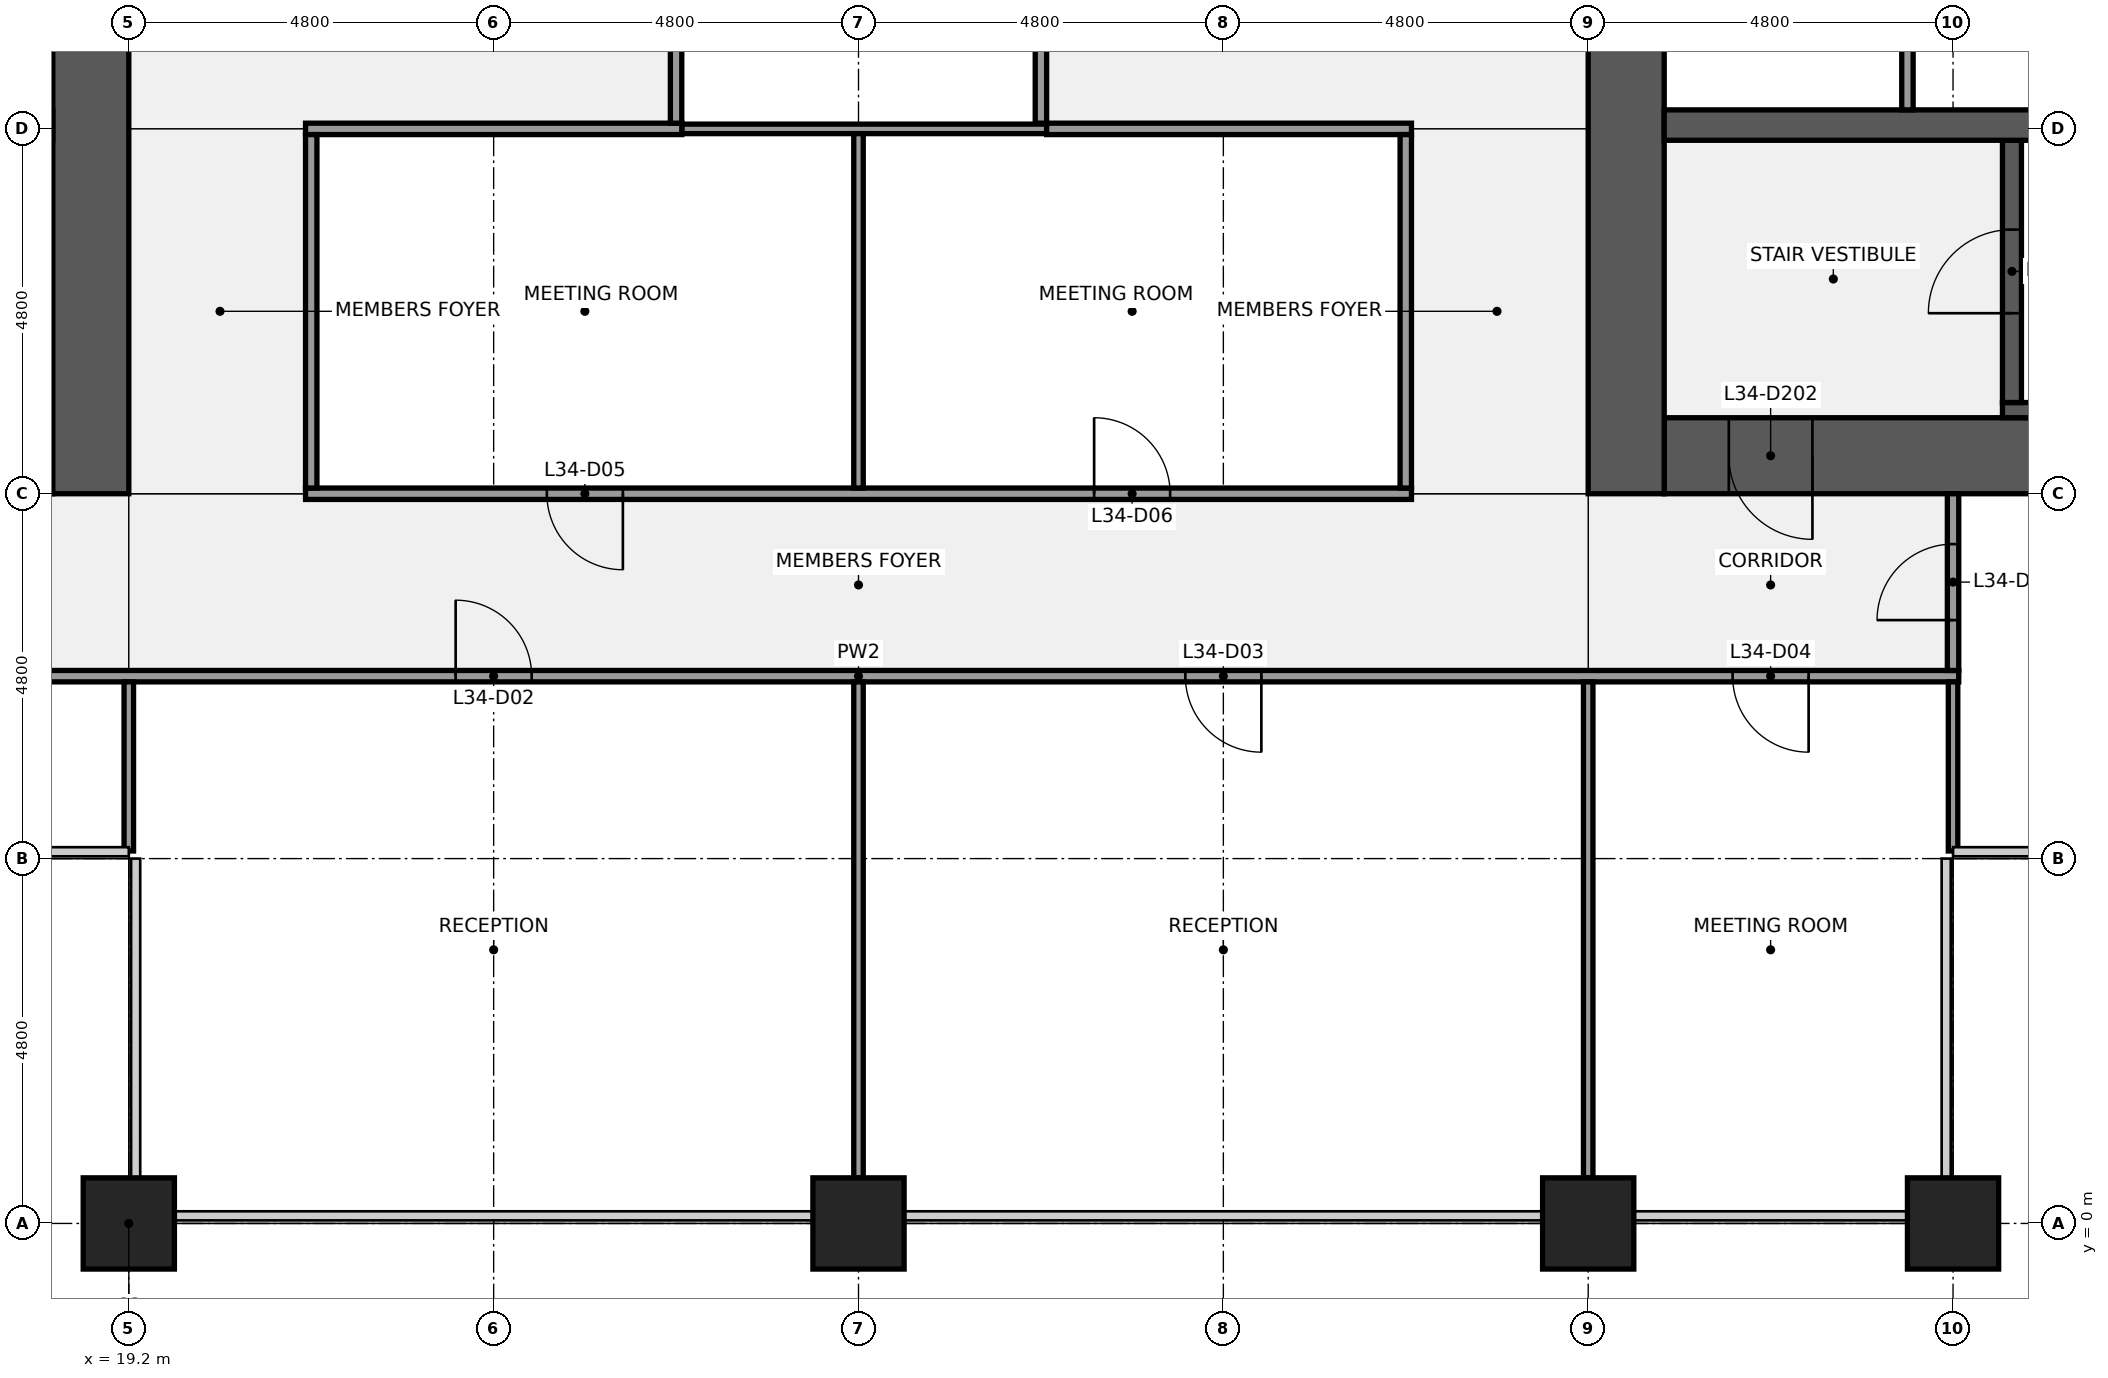
"""IFC4 building model, lengths in metres.
Left out: names, types, materials, properties, quantities, classifications, styles, units other than length and angle.
Written with IfcOpenShell. Run it as: python <this file> out.ifc"""

import sys

from ifc_helpers import new_model, si_unit, direction, frame, frame_2d, origin, origin_2d, place, context, subcontext, project, spatial, rectangle, extrude, element, fill, save


model = new_model("IFC4")
c1 = context("Model", 3, precision=1e-05, world=origin(), true_north=direction((0.0, 1.0)))
c2 = subcontext(c1, "Body", "Model", "MODEL_VIEW")
j1 = project(units=[si_unit("LENGTHUNIT", "METRE"), si_unit("PLANEANGLEUNIT", "RADIAN")], contexts=[c1])
p1 = place(None, origin())
s1 = spatial("IfcSite", under=j1, at=p1, CompositionType="ELEMENT")
p2 = place(p1, origin())
s2 = spatial("IfcBuilding", under=s1, at=p2, CompositionType="ELEMENT")
p3 = place(p2, frame((0.0, 0.0, 156.1)))
s3 = spatial("IfcBuildingStorey", under=s2, at=p3, CompositionType="ELEMENT", Elevation=156.1)
for number, where, z_axis, x_axis in (
    (1, (19.2, 0.0, 0.0), (0.0, 0.0, 1.0), (1.0, 0.0, 0.0)),
    (2, (28.8, 0.0, 0.0), (0.0, 0.0, 1.0), (1.0, 0.0, 0.0)),
    (3, (38.4, 0.0, 0.0), (0.0, 0.0, 1.0), (1.0, 0.0, 0.0)),
    (4, (43.2, 0.0, 0.0), (0.0, 0.0, 1.0), (1.0, 0.0, 0.0)),
):
    element("IfcColumn", number, at=place(p3, frame(where, z_axis=z_axis, x_axis=x_axis)), inside=s3, PredefinedType="COLUMN", context=c2, shape_type="SweptSolid", body=[
        extrude(rectangle(XDim=1.2, YDim=1.2, at=origin_2d()), origin(), (0.0, 0.0, 1.0), 4.0),
    ])
p4 = place(p3, frame((18.2, 10.1, 0.0), z_axis=(0.0, 0.0, 1.0), x_axis=(-1.0, 0.0, 0.0)))
e5 = element("IfcWall", 5, at=p4, inside=s3, PredefinedType="SHEAR", context=c2, shape_type="SweptSolid", body=[
    extrude(rectangle(XDim=8.6, YDim=1.0, at=frame_2d((4.3, 0.0))), origin(), (0.0, 0.0, 1.0), 3.84),
])
p5 = place(p4, frame((0.85, 0.0, 0.0)))
e6 = element("IfcOpeningElement", 6, at=p5, cuts=e5, PredefinedType="OPENING", context=c2, shape_type="SweptSolid", body=[
    extrude(rectangle(XDim=1.1, YDim=2.1, at=frame_2d((0.55, 1.05))), frame((0.0, 0.51, 0.0), z_axis=(0.0, -1.0, 0.0), x_axis=(1.0, 0.0, 0.0)), (0.0, 0.0, 1.0), 1.02),
])
p6 = place(p3, frame((18.7, 38.4, 0.0), z_axis=(0.0, 0.0, 1.0), x_axis=(0.0, -1.0, 0.0)))
e7 = element("IfcWall", 7, at=p6, inside=s3, PredefinedType="SHEAR", context=c2, shape_type="SweptSolid", body=[
    extrude(rectangle(XDim=28.8, YDim=1.0, at=frame_2d((14.4, 0.0))), origin(), (0.0, 0.0, 1.0), 3.84),
])
p7 = place(p6, frame((18.3, 0.0, 0.0)))
e8 = element("IfcOpeningElement", 8, at=p7, cuts=e7, PredefinedType="OPENING", context=c2, shape_type="SweptSolid", body=[
    extrude(rectangle(XDim=1.8, YDim=2.1, at=frame_2d((0.9, 1.05))), frame((0.0, 0.51, 0.0), z_axis=(0.0, -1.0, 0.0), x_axis=(1.0, 0.0, 0.0)), (0.0, 0.0, 1.0), 1.02),
])
p8 = place(p6, frame((8.7, 0.0, 0.0)))
e9 = element("IfcOpeningElement", 9, at=p8, cuts=e7, PredefinedType="OPENING", context=c2, shape_type="SweptSolid", body=[
    extrude(rectangle(XDim=1.8, YDim=2.1, at=frame_2d((0.9, 1.05))), frame((0.0, 0.51, 0.0), z_axis=(0.0, -1.0, 0.0), x_axis=(1.0, 0.0, 0.0)), (0.0, 0.0, 1.0), 1.02),
])
p9 = place(p3, frame((1.0, 14.45, 0.0), z_axis=(0.0, 0.0, 1.0), x_axis=(1.0, 0.0, 0.0)))
e10 = element("IfcWall", 10, at=p9, inside=s3, PredefinedType="SHEAR", context=c2, shape_type="SweptSolid", body=[
    extrude(rectangle(XDim=17.2, YDim=0.4, at=frame_2d((8.6, 0.0))), origin(), (0.0, 0.0, 1.0), 3.84),
])
p10 = place(p3, frame((48.0, 10.1, 0.0), z_axis=(0.0, 0.0, 1.0), x_axis=(-1.0, 0.0, 0.0)))
e11 = element("IfcWall", 11, at=p10, inside=s3, PredefinedType="SHEAR", context=c2, shape_type="SweptSolid", body=[
    extrude(rectangle(XDim=8.6, YDim=1.0, at=frame_2d((4.3, 0.0))), origin(), (0.0, 0.0, 1.0), 3.84),
])
p11 = place(p10, frame((6.65, 0.0, 0.0)))
e12 = element("IfcOpeningElement", 12, at=p11, cuts=e11, PredefinedType="OPENING", context=c2, shape_type="SweptSolid", body=[
    extrude(rectangle(XDim=1.1, YDim=2.1, at=frame_2d((0.55, 1.05))), frame((0.0, 0.51, 0.0), z_axis=(0.0, -1.0, 0.0), x_axis=(1.0, 0.0, 0.0)), (0.0, 0.0, 1.0), 1.02),
])
p12 = place(p3, frame((38.9, 9.6, 0.0), z_axis=(0.0, 0.0, 1.0), x_axis=(0.0, 1.0, 0.0)))
e13 = element("IfcWall", 13, at=p12, inside=s3, PredefinedType="SHEAR", context=c2, shape_type="SweptSolid", body=[
    extrude(rectangle(XDim=28.8, YDim=1.0, at=frame_2d((14.4, 0.0))), origin(), (0.0, 0.0, 1.0), 3.84),
])
p13 = place(p12, frame((8.7, 0.0, 0.0)))
e14 = element("IfcOpeningElement", 14, at=p13, cuts=e13, PredefinedType="OPENING", context=c2, shape_type="SweptSolid", body=[
    extrude(rectangle(XDim=1.8, YDim=2.1, at=frame_2d((0.9, 1.05))), frame((0.0, 0.51, 0.0), z_axis=(0.0, -1.0, 0.0), x_axis=(1.0, 0.0, 0.0)), (0.0, 0.0, 1.0), 1.02),
])
p14 = place(p12, frame((18.3, 0.0, 0.0)))
e15 = element("IfcOpeningElement", 15, at=p14, cuts=e13, PredefinedType="OPENING", context=c2, shape_type="SweptSolid", body=[
    extrude(rectangle(XDim=1.8, YDim=2.1, at=frame_2d((0.9, 1.05))), frame((0.0, 0.51, 0.0), z_axis=(0.0, -1.0, 0.0), x_axis=(1.0, 0.0, 0.0)), (0.0, 0.0, 1.0), 1.02),
])
p15 = place(p3, frame((43.85, 10.7, 0.0), z_axis=(0.0, 0.0, 1.0), x_axis=(1.0, 0.0, 0.0)))
e16 = element("IfcWall", 16, at=p15, inside=s3, PredefinedType="SHEAR", context=c2, shape_type="SweptSolid", body=[
    extrude(rectangle(XDim=4.15, YDim=0.2, at=frame_2d((2.075, 0.0))), origin(), (0.0, 0.0, 1.0), 3.84),
])
p16 = place(p3, frame((43.975, 10.8, 0.0), z_axis=(0.0, 0.0, 1.0), x_axis=(0.0, 1.0, 0.0)))
e17 = element("IfcWall", 17, at=p16, inside=s3, PredefinedType="SHEAR", context=c2, shape_type="SweptSolid", body=[
    extrude(rectangle(XDim=3.45, YDim=0.25, at=frame_2d((1.725, 0.0))), origin(), (0.0, 0.0, 1.0), 3.84),
])
p17 = place(p16, frame((1.175, 0.0, 0.0)))
e18 = element("IfcOpeningElement", 18, at=p17, cuts=e17, PredefinedType="OPENING", context=c2, shape_type="SweptSolid", body=[
    extrude(rectangle(XDim=1.1, YDim=2.1, at=frame_2d((0.55, 1.05))), frame((0.0, 0.135, 0.0), z_axis=(0.0, -1.0, 0.0), x_axis=(1.0, 0.0, 0.0)), (0.0, 0.0, 1.0), 0.27),
])
p18 = place(p3, frame((39.4, 14.45, 0.0), z_axis=(0.0, 0.0, 1.0), x_axis=(1.0, 0.0, 0.0)))
e19 = element("IfcWall", 19, at=p18, inside=s3, PredefinedType="SHEAR", context=c2, shape_type="SweptSolid", body=[
    extrude(rectangle(XDim=17.2, YDim=0.4, at=frame_2d((8.6, 0.0))), origin(), (0.0, 0.0, 1.0), 3.84),
])
p19 = place(p3, frame((42.6, 14.65, 0.0), z_axis=(0.0, 0.0, 1.0), x_axis=(0.0, 1.0, 0.0)))
e20 = element("IfcWall", 20, at=p19, inside=s3, PredefinedType="PARTITIONING", context=c2, shape_type="SweptSolid", body=[
    extrude(rectangle(XDim=2.6, YDim=0.15, at=frame_2d((1.3, 0.0))), origin(), (0.0, 0.0, 1.0), 3.84),
])
p20 = place(p3, frame((14.325, 7.2, 0.0), z_axis=(0.0, 0.0, 1.0), x_axis=(1.0, 0.0, 0.0)))
e21 = element("IfcWall", 21, at=p20, inside=s3, PredefinedType="PARTITIONING", context=c2, shape_type="SweptSolid", body=[
    extrude(rectangle(XDim=28.95, YDim=0.15, at=frame_2d((14.475, 0.0))), origin(), (0.0, 0.0, 1.0), 2.936),
])
p21 = place(p20, frame((1.975, 0.0, 0.0)))
e22 = element("IfcOpeningElement", 22, at=p21, cuts=e21, PredefinedType="OPENING", context=c2, shape_type="SweptSolid", body=[
    extrude(rectangle(XDim=1.0, YDim=2.1, at=frame_2d((0.5, 1.05))), frame((0.0, 0.085, 0.0), z_axis=(0.0, -1.0, 0.0), x_axis=(1.0, 0.0, 0.0)), (0.0, 0.0, 1.0), 0.17),
])
p22 = place(p20, frame((9.175, 0.0, 0.0)))
e23 = element("IfcOpeningElement", 23, at=p22, cuts=e21, PredefinedType="OPENING", context=c2, shape_type="SweptSolid", body=[
    extrude(rectangle(XDim=1.0, YDim=2.1, at=frame_2d((0.5, 1.05))), frame((0.0, 0.085, 0.0), z_axis=(0.0, -1.0, 0.0), x_axis=(1.0, 0.0, 0.0)), (0.0, 0.0, 1.0), 0.17),
])
p23 = place(p20, frame((18.775, 0.0, 0.0)))
e24 = element("IfcOpeningElement", 24, at=p23, cuts=e21, PredefinedType="OPENING", context=c2, shape_type="SweptSolid", body=[
    extrude(rectangle(XDim=1.0, YDim=2.1, at=frame_2d((0.5, 1.05))), frame((0.0, 0.085, 0.0), z_axis=(0.0, -1.0, 0.0), x_axis=(1.0, 0.0, 0.0)), (0.0, 0.0, 1.0), 0.17),
])
p24 = place(p20, frame((25.975, 0.0, 0.0)))
e25 = element("IfcOpeningElement", 25, at=p24, cuts=e21, PredefinedType="OPENING", context=c2, shape_type="SweptSolid", body=[
    extrude(rectangle(XDim=1.0, YDim=2.1, at=frame_2d((0.5, 1.05))), frame((0.0, 0.085, 0.0), z_axis=(0.0, -1.0, 0.0), x_axis=(1.0, 0.0, 0.0)), (0.0, 0.0, 1.0), 0.17),
])
p25 = place(p3, frame((21.525, 9.6, 0.0), z_axis=(0.0, 0.0, 1.0), x_axis=(1.0, 0.0, 0.0)))
e26 = element("IfcWall", 26, at=p25, inside=s3, PredefinedType="PARTITIONING", context=c2, shape_type="SweptSolid", body=[
    extrude(rectangle(XDim=14.55, YDim=0.15, at=frame_2d((7.275, 0.0))), origin(), (0.0, 0.0, 1.0), 2.936),
])
p26 = place(p25, frame((3.175, 0.0, 0.0)))
e27 = element("IfcOpeningElement", 27, at=p26, cuts=e26, PredefinedType="OPENING", context=c2, shape_type="SweptSolid", body=[
    extrude(rectangle(XDim=1.0, YDim=2.1, at=frame_2d((0.5, 1.05))), frame((0.0, 0.085, 0.0), z_axis=(0.0, -1.0, 0.0), x_axis=(1.0, 0.0, 0.0)), (0.0, 0.0, 1.0), 0.17),
])
p27 = place(p25, frame((10.375, 0.0, 0.0)))
e28 = element("IfcOpeningElement", 28, at=p27, cuts=e26, PredefinedType="OPENING", context=c2, shape_type="SweptSolid", body=[
    extrude(rectangle(XDim=1.0, YDim=2.1, at=frame_2d((0.5, 1.05))), frame((0.0, 0.085, 0.0), z_axis=(0.0, -1.0, 0.0), x_axis=(1.0, 0.0, 0.0)), (0.0, 0.0, 1.0), 0.17),
])
p28 = place(p3, frame((26.475, 14.4, 0.0), z_axis=(0.0, 0.0, 1.0), x_axis=(1.0, 0.0, 0.0)))
e29 = element("IfcWall", 29, at=p28, inside=s3, PredefinedType="PARTITIONING", context=c2, shape_type="SweptSolid", body=[
    extrude(rectangle(XDim=4.8, YDim=0.125, at=frame_2d((2.4, 0.0))), origin(), (0.0, 0.0, 1.0), 2.936),
])
p29 = place(p3, frame((21.525, 14.4, 0.0), z_axis=(0.0, 0.0, 1.0), x_axis=(1.0, 0.0, 0.0)))
e30 = element("IfcWall", 30, at=p29, inside=s3, PredefinedType="PARTITIONING", context=c2, shape_type="SweptSolid", body=[
    extrude(rectangle(XDim=4.95, YDim=0.15, at=frame_2d((2.475, 0.0))), origin(), (0.0, 0.0, 1.0), 2.936),
])
p30 = place(p3, frame((31.275, 14.4, 0.0), z_axis=(0.0, 0.0, 1.0), x_axis=(1.0, 0.0, 0.0)))
e31 = element("IfcWall", 31, at=p30, inside=s3, PredefinedType="PARTITIONING", context=c2, shape_type="SweptSolid", body=[
    extrude(rectangle(XDim=4.8, YDim=0.15, at=frame_2d((2.4, 0.0))), origin(), (0.0, 0.0, 1.0), 2.936),
])
p31 = place(p3, frame((19.2, 4.9, 0.0), z_axis=(0.0, 0.0, 1.0), x_axis=(0.0, 1.0, 0.0)))
e32 = element("IfcWall", 32, at=p31, inside=s3, PredefinedType="PARTITIONING", context=c2, shape_type="SweptSolid", body=[
    extrude(rectangle(XDim=2.225, YDim=0.125, at=frame_2d((1.113, 0.0))), origin(), (0.0, 0.0, 1.0), 2.936),
])
p32 = place(p3, frame((21.6, 9.675, 0.0), z_axis=(0.0, 0.0, 1.0), x_axis=(0.0, 1.0, 0.0)))
e33 = element("IfcWall", 33, at=p32, inside=s3, PredefinedType="PARTITIONING", context=c2, shape_type="SweptSolid", body=[
    extrude(rectangle(XDim=4.65, YDim=0.15, at=frame_2d((2.325, 0.0))), origin(), (0.0, 0.0, 1.0), 2.936),
])
p33 = place(p3, frame((26.4, 14.475, 0.0), z_axis=(0.0, 0.0, 1.0), x_axis=(0.0, 1.0, 0.0)))
e34 = element("IfcWall", 34, at=p33, inside=s3, PredefinedType="PARTITIONING", context=c2, shape_type="SweptSolid", body=[
    extrude(rectangle(XDim=13.05, YDim=0.15, at=frame_2d((6.525, 0.0))), origin(), (0.0, 0.0, 1.0), 2.936),
])
p34 = place(p33, frame((6.025, 0.0, 0.0)))
e35 = element("IfcOpeningElement", 35, at=p34, cuts=e34, PredefinedType="OPENING", context=c2, shape_type="SweptSolid", body=[
    extrude(rectangle(XDim=1.0, YDim=2.1, at=frame_2d((0.5, 1.05))), frame((0.0, 0.085, 0.0), z_axis=(0.0, -1.0, 0.0), x_axis=(1.0, 0.0, 0.0)), (0.0, 0.0, 1.0), 0.17),
])
p35 = place(p3, frame((28.8, 0.6, 0.0), z_axis=(0.0, 0.0, 1.0), x_axis=(0.0, 1.0, 0.0)))
e36 = element("IfcWall", 36, at=p35, inside=s3, PredefinedType="PARTITIONING", context=c2, shape_type="SweptSolid", body=[
    extrude(rectangle(XDim=6.525, YDim=0.125, at=frame_2d((3.262, 0.0))), origin(), (0.0, 0.0, 1.0), 2.936),
])
p36 = place(p3, frame((28.8, 9.675, 0.0), z_axis=(0.0, 0.0, 1.0), x_axis=(0.0, 1.0, 0.0)))
e37 = element("IfcWall", 37, at=p36, inside=s3, PredefinedType="PARTITIONING", context=c2, shape_type="SweptSolid", body=[
    extrude(rectangle(XDim=4.662, YDim=0.125, at=frame_2d((2.331, 0.0))), origin(), (0.0, 0.0, 1.0), 2.936),
])
p37 = place(p3, frame((31.2, 14.475, 0.0), z_axis=(0.0, 0.0, 1.0), x_axis=(0.0, 1.0, 0.0)))
e38 = element("IfcWall", 38, at=p37, inside=s3, PredefinedType="PARTITIONING", context=c2, shape_type="SweptSolid", body=[
    extrude(rectangle(XDim=13.05, YDim=0.15, at=frame_2d((6.525, 0.0))), origin(), (0.0, 0.0, 1.0), 2.936),
])
p38 = place(p3, frame((36.0, 9.675, 0.0), z_axis=(0.0, 0.0, 1.0), x_axis=(0.0, 1.0, 0.0)))
e39 = element("IfcWall", 39, at=p38, inside=s3, PredefinedType="PARTITIONING", context=c2, shape_type="SweptSolid", body=[
    extrude(rectangle(XDim=4.65, YDim=0.15, at=frame_2d((2.325, 0.0))), origin(), (0.0, 0.0, 1.0), 2.936),
])
p39 = place(p3, frame((38.4, 0.6, 0.0), z_axis=(0.0, 0.0, 1.0), x_axis=(0.0, 1.0, 0.0)))
e40 = element("IfcWall", 40, at=p39, inside=s3, PredefinedType="PARTITIONING", context=c2, shape_type="SweptSolid", body=[
    extrude(rectangle(XDim=6.525, YDim=0.125, at=frame_2d((3.262, 0.0))), origin(), (0.0, 0.0, 1.0), 2.936),
])
p40 = place(p3, frame((43.2, 4.9, 0.0), z_axis=(0.0, 0.0, 1.0), x_axis=(0.0, 1.0, 0.0)))
e41 = element("IfcWall", 41, at=p40, inside=s3, PredefinedType="PARTITIONING", context=c2, shape_type="SweptSolid", body=[
    extrude(rectangle(XDim=2.225, YDim=0.125, at=frame_2d((1.113, 0.0))), origin(), (0.0, 0.0, 1.0), 2.936),
])
p41 = place(p3, frame((43.2, 7.275, 0.0), z_axis=(0.0, 0.0, 1.0), x_axis=(0.0, 1.0, 0.0)))
e42 = element("IfcWall", 42, at=p41, inside=s3, PredefinedType="PARTITIONING", context=c2, shape_type="SweptSolid", body=[
    extrude(rectangle(XDim=2.325, YDim=0.15, at=frame_2d((1.163, 0.0))), origin(), (0.0, 0.0, 1.0), 2.936),
])
p42 = place(p41, frame((0.663, 0.0, 0.0)))
e43 = element("IfcOpeningElement", 43, at=p42, cuts=e42, PredefinedType="OPENING", context=c2, shape_type="SweptSolid", body=[
    extrude(rectangle(XDim=1.0, YDim=2.1, at=frame_2d((0.5, 1.05))), frame((0.0, 0.085, 0.0), z_axis=(0.0, -1.0, 0.0), x_axis=(1.0, 0.0, 0.0)), (0.0, 0.0, 1.0), 0.17),
])
for number, where, z_axis, x_axis in (
    (44, (19.2, -1.05, 0.0), (0.0, 0.0, 1.0), (1.0, 0.0, 0.0)),
    (45, (38.4, -1.05, 0.0), (0.0, 0.0, 1.0), (1.0, 0.0, 0.0)),
    (46, (43.2, -1.05, 0.0), (0.0, 0.0, 1.0), (1.0, 0.0, 0.0)),
):
    element("IfcColumn", number, at=place(p3, frame(where, z_axis=z_axis, x_axis=x_axis)), inside=s3, PredefinedType="PILASTER", context=c2, shape_type="SweptSolid", body=[
        extrude(rectangle(XDim=3.6, YDim=0.9, at=origin_2d()), origin(), (0.0, 0.0, 1.0), 4.0),
    ])
p43 = place(p17, origin())
e47 = element("IfcDoor", 47, at=p43, inside=s3, OperationType="SINGLE_SWING_LEFT", PredefinedType="DOOR", context=c2, shape_type="SweptSolid", body=[
    extrude(rectangle(XDim=1.1, YDim=2.1, at=frame_2d((0.55, 1.05))), frame((0.0, 0.025, 0.0), z_axis=(0.0, -1.0, 0.0), x_axis=(1.0, 0.0, 0.0)), (0.0, 0.0, 1.0), 0.05),
])
fill(e18, e47)
p44 = place(p11, origin())
e48 = element("IfcDoor", 48, at=p44, inside=s3, OperationType="SINGLE_SWING_LEFT", PredefinedType="DOOR", context=c2, shape_type="SweptSolid", body=[
    extrude(rectangle(XDim=1.1, YDim=2.1, at=frame_2d((0.55, 1.05))), frame((0.0, 0.025, 0.0), z_axis=(0.0, -1.0, 0.0), x_axis=(1.0, 0.0, 0.0)), (0.0, 0.0, 1.0), 0.05),
])
fill(e12, e48)
p45 = place(p22, origin())
e49 = element("IfcDoor", 49, at=p45, inside=s3, OperationType="SINGLE_SWING_LEFT", PredefinedType="DOOR", context=c2, shape_type="SweptSolid", body=[
    extrude(rectangle(XDim=1.0, YDim=2.1, at=frame_2d((0.5, 1.05))), frame((0.0, 0.025, 0.0), z_axis=(0.0, -1.0, 0.0), x_axis=(1.0, 0.0, 0.0)), (0.0, 0.0, 1.0), 0.05),
])
fill(e23, e49)
p46 = place(p23, origin())
e50 = element("IfcDoor", 50, at=p46, inside=s3, OperationType="SINGLE_SWING_RIGHT", PredefinedType="DOOR", context=c2, shape_type="SweptSolid", body=[
    extrude(rectangle(XDim=1.0, YDim=2.1, at=frame_2d((0.5, 1.05))), frame((0.0, 0.025, 0.0), z_axis=(0.0, -1.0, 0.0), x_axis=(1.0, 0.0, 0.0)), (0.0, 0.0, 1.0), 0.05),
])
fill(e24, e50)
p47 = place(p24, origin())
e51 = element("IfcDoor", 51, at=p47, inside=s3, OperationType="SINGLE_SWING_RIGHT", PredefinedType="DOOR", context=c2, shape_type="SweptSolid", body=[
    extrude(rectangle(XDim=1.0, YDim=2.1, at=frame_2d((0.5, 1.05))), frame((0.0, 0.025, 0.0), z_axis=(0.0, -1.0, 0.0), x_axis=(1.0, 0.0, 0.0)), (0.0, 0.0, 1.0), 0.05),
])
fill(e25, e51)
p48 = place(p26, origin())
e52 = element("IfcDoor", 52, at=p48, inside=s3, OperationType="SINGLE_SWING_RIGHT", PredefinedType="DOOR", context=c2, shape_type="SweptSolid", body=[
    extrude(rectangle(XDim=1.0, YDim=2.1, at=frame_2d((0.5, 1.05))), frame((0.0, 0.025, 0.0), z_axis=(0.0, -1.0, 0.0), x_axis=(1.0, 0.0, 0.0)), (0.0, 0.0, 1.0), 0.05),
])
fill(e27, e52)
p49 = place(p27, origin())
e53 = element("IfcDoor", 53, at=p49, inside=s3, OperationType="SINGLE_SWING_LEFT", PredefinedType="DOOR", context=c2, shape_type="SweptSolid", body=[
    extrude(rectangle(XDim=1.0, YDim=2.1, at=frame_2d((0.5, 1.05))), frame((0.0, 0.025, 0.0), z_axis=(0.0, -1.0, 0.0), x_axis=(1.0, 0.0, 0.0)), (0.0, 0.0, 1.0), 0.05),
])
fill(e28, e53)
p50 = place(p42, origin())
e54 = element("IfcDoor", 54, at=p50, inside=s3, OperationType="SINGLE_SWING_LEFT", PredefinedType="DOOR", context=c2, shape_type="SweptSolid", body=[
    extrude(rectangle(XDim=1.0, YDim=2.1, at=frame_2d((0.5, 1.05))), frame((0.0, 0.025, 0.0), z_axis=(0.0, -1.0, 0.0), x_axis=(1.0, 0.0, 0.0)), (0.0, 0.0, 1.0), 0.05),
])
fill(e43, e54)
save(model, sys.argv[1])
